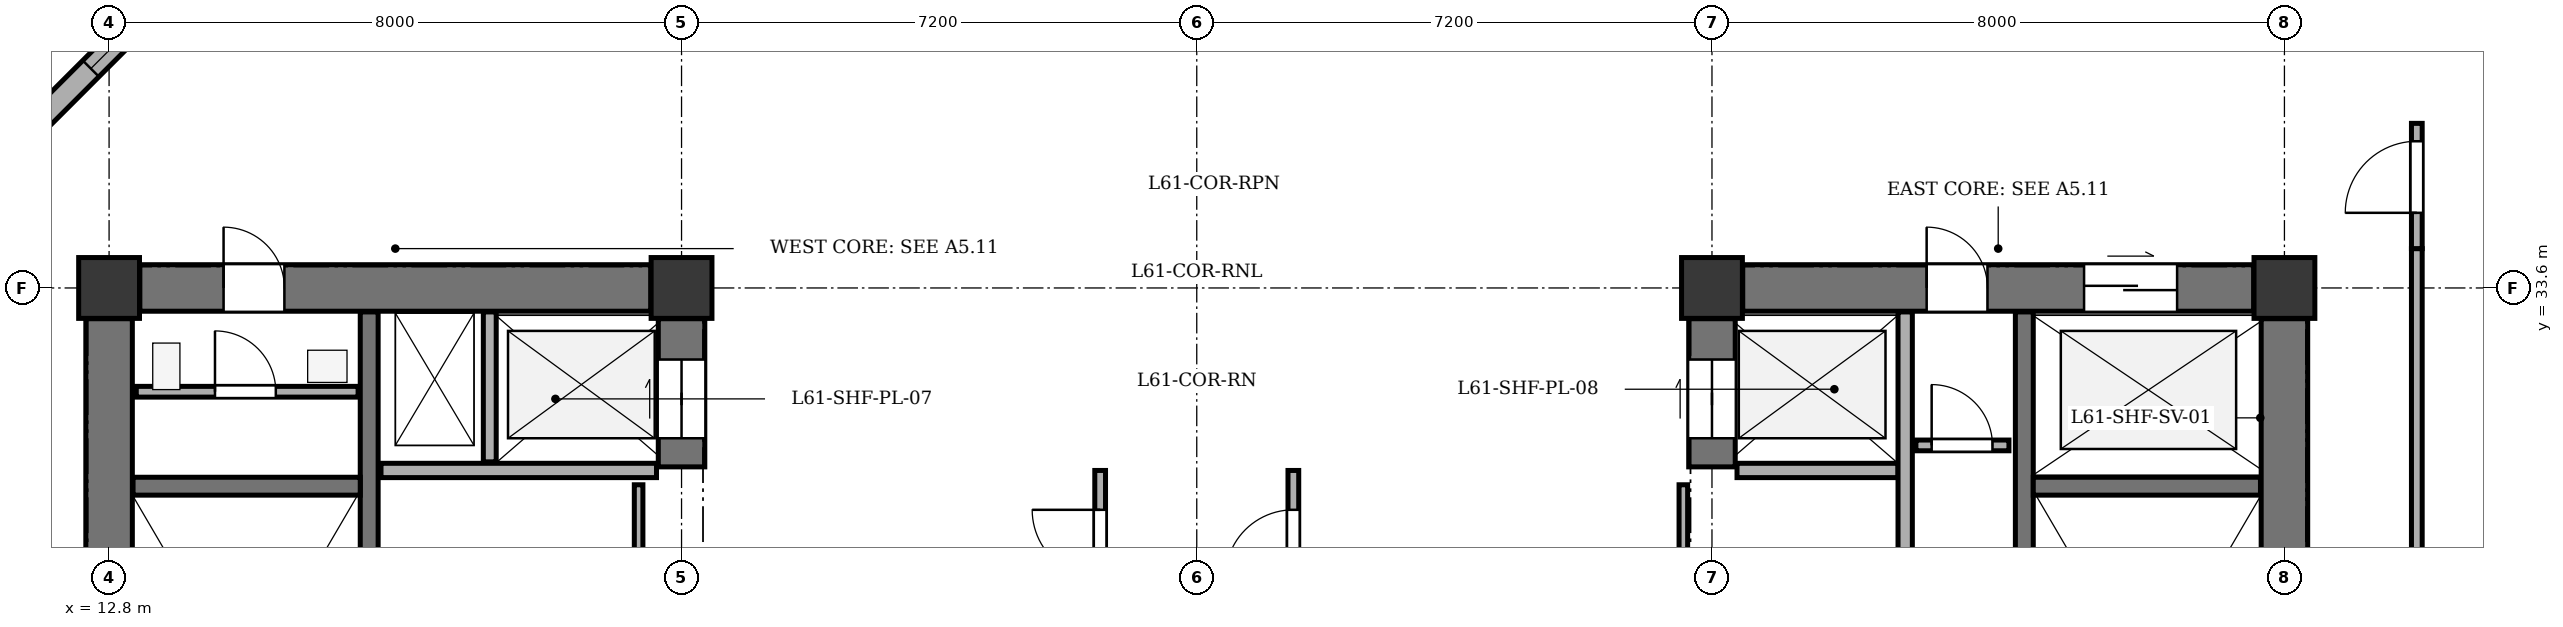
"""IFC4 building model, lengths in metres.
Left out: names, types, materials, properties, quantities, classifications, styles, units other than length and angle.
Written with IfcOpenShell. Run it as: python <this file> out.ifc"""

import sys

from ifc_helpers import new_model, si_unit, direction, frame, frame_2d, origin, origin_2d, place, context, subcontext, project, spatial, rectangle, extrude, element, fill, save


model = new_model("IFC4")
c1 = context("Model", 3, precision=1e-05, world=origin(), true_north=direction((0.0, 1.0)))
c2 = subcontext(c1, "Body", "Model", "MODEL_VIEW")
j1 = project(units=[si_unit("LENGTHUNIT", "METRE"), si_unit("PLANEANGLEUNIT", "RADIAN")], contexts=[c1])
p1 = place(None, origin())
s1 = spatial("IfcSite", under=j1, at=p1, CompositionType="ELEMENT")
p2 = place(p1, origin())
s2 = spatial("IfcBuilding", under=s1, at=p2, CompositionType="ELEMENT")
p3 = place(p2, frame((0.0, 0.0, 234.7)))
s3 = spatial("IfcBuildingStorey", under=s2, at=p3, CompositionType="ELEMENT", Elevation=234.7)
for number, where, z_axis, x_axis in (
    (1, (12.8, 33.6, 0.0), (0.0, 0.0, 1.0), (1.0, 0.0, 0.0)),
    (2, (20.8, 33.6, 0.0), (0.0, 0.0, 1.0), (1.0, 0.0, 0.0)),
    (3, (35.2, 33.6, 0.0), (0.0, 0.0, 1.0), (1.0, 0.0, 0.0)),
    (4, (43.2, 33.6, 0.0), (0.0, 0.0, 1.0), (1.0, 0.0, 0.0)),
):
    element("IfcColumn", number, at=place(p3, frame(where, z_axis=z_axis, x_axis=x_axis)), inside=s3, PredefinedType="COLUMN", context=c2, shape_type="SweptSolid", body=[
        extrude(rectangle(XDim=0.85, YDim=0.85, at=origin_2d()), origin(), (0.0, 0.0, 1.0), 3.4),
    ])
p4 = place(p3, frame((10.88, 35.0, 0.0), z_axis=(0.0, 0.0, 1.0), x_axis=(0.707106781187, 0.707106781187, 0.0)))
e5 = element("IfcWall", 5, at=p4, inside=s3, PredefinedType="STANDARD", context=c2, shape_type="SweptSolid", body=[
    extrude(rectangle(XDim=6.11, YDim=0.32, at=frame_2d((3.055, 0.0))), origin(), (0.0, 0.0, 1.0), 2.725),
])
p5 = place(p4, frame((2.355, 0.0, 0.75)))
e6 = element("IfcOpeningElement", 6, at=p5, cuts=e5, PredefinedType="OPENING", context=c2, shape_type="SweptSolid", body=[
    extrude(rectangle(XDim=1.4, YDim=1.65, at=frame_2d((0.7, 0.825))), frame((0.0, 0.17, 0.0), z_axis=(0.0, -1.0, 0.0), x_axis=(1.0, 0.0, 0.0)), (0.0, 0.0, 1.0), 0.34),
])
p6 = place(p3, frame((12.8, 21.23, 0.0), z_axis=(0.0, 0.0, 1.0), x_axis=(0.0, 1.0, 0.0)))
e7 = element("IfcWall", 7, at=p6, inside=s3, PredefinedType="SHEAR", context=c2, shape_type="SweptSolid", body=[
    extrude(rectangle(XDim=11.94, YDim=0.65, at=frame_2d((5.97, 0.0))), origin(), (0.0, 0.0, 1.0), 3.1),
])
p7 = place(p3, frame((13.23, 33.6, 0.0), z_axis=(0.0, 0.0, 1.0), x_axis=(1.0, 0.0, 0.0)))
e8 = element("IfcWall", 8, at=p7, inside=s3, PredefinedType="SHEAR", context=c2, shape_type="SweptSolid", body=[
    extrude(rectangle(XDim=7.14, YDim=0.65, at=frame_2d((3.57, 0.0))), origin(), (0.0, 0.0, 1.0), 3.1),
])
p8 = place(p7, frame((1.17, 0.0, 0.0)))
e9 = element("IfcOpeningElement", 9, at=p8, cuts=e8, PredefinedType="OPENING", context=c2, shape_type="SweptSolid", body=[
    extrude(rectangle(XDim=0.85, YDim=2.02, at=frame_2d((0.425, 1.01))), frame((0.0, 0.335, 0.0), z_axis=(0.0, -1.0, 0.0), x_axis=(1.0, 0.0, 0.0)), (0.0, 0.0, 1.0), 0.67),
])
p9 = place(p3, frame((20.8, 31.1, 0.0), z_axis=(0.0, 0.0, 1.0), x_axis=(0.0, 1.0, 0.0)))
e10 = element("IfcWall", 10, at=p9, inside=s3, PredefinedType="SHEAR", context=c2, shape_type="SweptSolid", body=[
    extrude(rectangle(XDim=2.07, YDim=0.65, at=frame_2d((1.035, 0.0))), origin(), (0.0, 0.0, 1.0), 3.1),
])
p10 = place(p9, frame((0.4, 0.0, 0.0)))
e11 = element("IfcOpeningElement", 11, at=p10, cuts=e10, PredefinedType="OPENING", context=c2, shape_type="SweptSolid", body=[
    extrude(rectangle(XDim=1.1, YDim=2.1, at=frame_2d((0.55, 1.05))), frame((0.0, 0.335, 0.0), z_axis=(0.0, -1.0, 0.0), x_axis=(1.0, 0.0, 0.0)), (0.0, 0.0, 1.0), 0.67),
])
p11 = place(p3, frame((16.435, 21.135, 0.0), z_axis=(0.0, 0.0, 1.0), x_axis=(0.0, 1.0, 0.0)))
e12 = element("IfcWall", 12, at=p11, inside=s3, PredefinedType="SHEAR", context=c2, shape_type="SweptSolid", body=[
    extrude(rectangle(XDim=12.13, YDim=0.25, at=frame_2d((6.065, 0.0))), origin(), (0.0, 0.0, 1.0), 3.1),
])
p12 = place(p11, frame((0.515, 0.0, 0.0)))
e13 = element("IfcOpeningElement", 13, at=p12, cuts=e12, PredefinedType="OPENING", context=c2, shape_type="SweptSolid", body=[
    extrude(rectangle(XDim=1.2, YDim=2.15, at=frame_2d((0.6, 1.075))), frame((0.0, 0.135, 0.0), z_axis=(0.0, -1.0, 0.0), x_axis=(1.0, 0.0, 0.0)), (0.0, 0.0, 1.0), 0.27),
])
p13 = place(p11, frame((2.665, 0.0, 0.0)))
e14 = element("IfcOpeningElement", 14, at=p13, cuts=e12, PredefinedType="OPENING", context=c2, shape_type="SweptSolid", body=[
    extrude(rectangle(XDim=1.15, YDim=2.15, at=frame_2d((0.575, 1.075))), frame((0.0, 0.135, 0.0), z_axis=(0.0, -1.0, 0.0), x_axis=(1.0, 0.0, 0.0)), (0.0, 0.0, 1.0), 0.27),
])
p14 = place(p3, frame((13.135, 30.83, 0.0), z_axis=(0.0, 0.0, 1.0), x_axis=(1.0, 0.0, 0.0)))
e15 = element("IfcWall", 15, at=p14, inside=s3, PredefinedType="SHEAR", context=c2, shape_type="SweptSolid", body=[
    extrude(rectangle(XDim=3.175, YDim=0.25, at=frame_2d((1.587, 0.0))), origin(), (0.0, 0.0, 1.0), 3.1),
])
p15 = place(p3, frame((16.6, 31.05, 0.0), z_axis=(0.0, 0.0, 1.0), x_axis=(1.0, 0.0, 0.0)))
e16 = element("IfcWall", 16, at=p15, inside=s3, PredefinedType="SOLIDWALL", context=c2, shape_type="SweptSolid", body=[
    extrude(rectangle(XDim=3.85, YDim=0.2, at=frame_2d((1.925, 0.0))), origin(), (0.0, 0.0, 1.0), 3.1),
])
p16 = place(p3, frame((18.12, 31.17, 0.0), z_axis=(0.0, 0.0, 1.0), x_axis=(0.0, 1.0, 0.0)))
e17 = element("IfcWall", 17, at=p16, inside=s3, PredefinedType="PARTITIONING", context=c2, shape_type="SweptSolid", body=[
    extrude(rectangle(XDim=2.095, YDim=0.18, at=frame_2d((1.047, 0.0))), origin(), (0.0, 0.0, 1.0), 3.1),
])
p17 = place(p3, frame((43.2, 21.23, 0.0), z_axis=(0.0, 0.0, 1.0), x_axis=(0.0, 1.0, 0.0)))
e18 = element("IfcWall", 18, at=p17, inside=s3, PredefinedType="SHEAR", context=c2, shape_type="SweptSolid", body=[
    extrude(rectangle(XDim=11.94, YDim=0.65, at=frame_2d((5.97, 0.0))), origin(), (0.0, 0.0, 1.0), 3.1),
])
p18 = place(p3, frame((35.63, 33.6, 0.0), z_axis=(0.0, 0.0, 1.0), x_axis=(1.0, 0.0, 0.0)))
e19 = element("IfcWall", 19, at=p18, inside=s3, PredefinedType="SHEAR", context=c2, shape_type="SweptSolid", body=[
    extrude(rectangle(XDim=7.14, YDim=0.65, at=frame_2d((3.57, 0.0))), origin(), (0.0, 0.0, 1.0), 3.1),
])
p19 = place(p18, frame((4.77, 0.0, 0.0)))
e20 = element("IfcOpeningElement", 20, at=p19, cuts=e19, PredefinedType="OPENING", context=c2, shape_type="SweptSolid", body=[
    extrude(rectangle(XDim=1.3, YDim=2.15, at=frame_2d((0.65, 1.075))), frame((0.0, 0.335, 0.0), z_axis=(0.0, -1.0, 0.0), x_axis=(1.0, 0.0, 0.0)), (0.0, 0.0, 1.0), 0.67),
])
p20 = place(p18, frame((2.57, 0.0, 0.0)))
e21 = element("IfcOpeningElement", 21, at=p20, cuts=e19, PredefinedType="OPENING", context=c2, shape_type="SweptSolid", body=[
    extrude(rectangle(XDim=0.85, YDim=2.02, at=frame_2d((0.425, 1.01))), frame((0.0, 0.335, 0.0), z_axis=(0.0, -1.0, 0.0), x_axis=(1.0, 0.0, 0.0)), (0.0, 0.0, 1.0), 0.67),
])
p21 = place(p3, frame((35.2, 31.1, 0.0), z_axis=(0.0, 0.0, 1.0), x_axis=(0.0, 1.0, 0.0)))
e22 = element("IfcWall", 22, at=p21, inside=s3, PredefinedType="SHEAR", context=c2, shape_type="SweptSolid", body=[
    extrude(rectangle(XDim=2.07, YDim=0.65, at=frame_2d((1.035, 0.0))), origin(), (0.0, 0.0, 1.0), 3.1),
])
p22 = place(p21, frame((0.4, 0.0, 0.0)))
e23 = element("IfcOpeningElement", 23, at=p22, cuts=e22, PredefinedType="OPENING", context=c2, shape_type="SweptSolid", body=[
    extrude(rectangle(XDim=1.1, YDim=2.1, at=frame_2d((0.55, 1.05))), frame((0.0, 0.335, 0.0), z_axis=(0.0, -1.0, 0.0), x_axis=(1.0, 0.0, 0.0)), (0.0, 0.0, 1.0), 0.67),
])
p23 = place(p3, frame((39.565, 21.135, 0.0), z_axis=(0.0, 0.0, 1.0), x_axis=(0.0, 1.0, 0.0)))
e24 = element("IfcWall", 24, at=p23, inside=s3, PredefinedType="SHEAR", context=c2, shape_type="SweptSolid", body=[
    extrude(rectangle(XDim=12.13, YDim=0.25, at=frame_2d((6.065, 0.0))), origin(), (0.0, 0.0, 1.0), 3.1),
])
p24 = place(p23, frame((0.515, 0.0, 0.0)))
e25 = element("IfcOpeningElement", 25, at=p24, cuts=e24, PredefinedType="OPENING", context=c2, shape_type="SweptSolid", body=[
    extrude(rectangle(XDim=1.2, YDim=2.15, at=frame_2d((0.6, 1.075))), frame((0.0, 0.135, 0.0), z_axis=(0.0, -1.0, 0.0), x_axis=(1.0, 0.0, 0.0)), (0.0, 0.0, 1.0), 0.27),
])
p25 = place(p23, frame((2.665, 0.0, 0.0)))
e26 = element("IfcOpeningElement", 26, at=p25, cuts=e24, PredefinedType="OPENING", context=c2, shape_type="SweptSolid", body=[
    extrude(rectangle(XDim=1.15, YDim=2.15, at=frame_2d((0.575, 1.075))), frame((0.0, 0.135, 0.0), z_axis=(0.0, -1.0, 0.0), x_axis=(1.0, 0.0, 0.0)), (0.0, 0.0, 1.0), 0.27),
])
p26 = place(p3, frame((39.69, 30.83, 0.0), z_axis=(0.0, 0.0, 1.0), x_axis=(1.0, 0.0, 0.0)))
e27 = element("IfcWall", 27, at=p26, inside=s3, PredefinedType="SHEAR", context=c2, shape_type="SweptSolid", body=[
    extrude(rectangle(XDim=3.175, YDim=0.25, at=frame_2d((1.587, 0.0))), origin(), (0.0, 0.0, 1.0), 3.1),
])
p27 = place(p3, frame((35.55, 31.05, 0.0), z_axis=(0.0, 0.0, 1.0), x_axis=(1.0, 0.0, 0.0)))
e28 = element("IfcWall", 28, at=p27, inside=s3, PredefinedType="SOLIDWALL", context=c2, shape_type="SweptSolid", body=[
    extrude(rectangle(XDim=2.25, YDim=0.2, at=frame_2d((1.125, 0.0))), origin(), (0.0, 0.0, 1.0), 3.1),
])
p28 = place(p3, frame((37.9, 25.27, 0.0), z_axis=(0.0, 0.0, 1.0), x_axis=(0.0, 1.0, 0.0)))
e29 = element("IfcWall", 29, at=p28, inside=s3, PredefinedType="SOLIDWALL", context=c2, shape_type="SweptSolid", body=[
    extrude(rectangle(XDim=7.995, YDim=0.2, at=frame_2d((3.998, 0.0))), origin(), (0.0, 0.0, 1.0), 3.1),
])
p29 = place(p3, frame((13.18, 32.15, 0.0), z_axis=(0.0, 0.0, 1.0), x_axis=(1.0, 0.0, 0.0)))
e30 = element("IfcWall", 30, at=p29, inside=s3, PredefinedType="PARTITIONING", context=c2, shape_type="SweptSolid", body=[
    extrude(rectangle(XDim=3.1, YDim=0.15, at=frame_2d((1.55, 0.0))), origin(), (0.0, 0.0, 1.0), 3.1),
])
p30 = place(p29, frame((1.1, 0.0, 0.0)))
e31 = element("IfcOpeningElement", 31, at=p30, cuts=e30, PredefinedType="OPENING", context=c2, shape_type="SweptSolid", body=[
    extrude(rectangle(XDim=0.85, YDim=2.02, at=frame_2d((0.425, 1.01))), frame((0.0, 0.085, 0.0), z_axis=(0.0, -1.0, 0.0), x_axis=(1.0, 0.0, 0.0)), (0.0, 0.0, 1.0), 0.17),
])
p31 = place(p3, frame((38.05, 31.4, 0.0), z_axis=(0.0, 0.0, 1.0), x_axis=(1.0, 0.0, 0.0)))
e32 = element("IfcWall", 32, at=p31, inside=s3, PredefinedType="PARTITIONING", context=c2, shape_type="SweptSolid", body=[
    extrude(rectangle(XDim=1.3, YDim=0.15, at=frame_2d((0.65, 0.0))), origin(), (0.0, 0.0, 1.0), 3.1),
])
p32 = place(p31, frame((0.22, 0.0, 0.0)))
e33 = element("IfcOpeningElement", 33, at=p32, cuts=e32, PredefinedType="OPENING", context=c2, shape_type="SweptSolid", body=[
    extrude(rectangle(XDim=0.85, YDim=2.02, at=frame_2d((0.425, 1.01))), frame((0.0, 0.085, 0.0), z_axis=(0.0, -1.0, 0.0), x_axis=(1.0, 0.0, 0.0)), (0.0, 0.0, 1.0), 0.17),
])
p33 = place(p3, frame((26.65, 25.23, 0.0), z_axis=(0.0, 0.0, 1.0), x_axis=(0.0, 1.0, 0.0)))
e34 = element("IfcWall", 34, at=p33, inside=s3, PredefinedType="PARTITIONING", context=c2, shape_type="SweptSolid", body=[
    extrude(rectangle(XDim=5.82, YDim=0.15, at=frame_2d((2.91, 0.0))), origin(), (0.0, 0.0, 1.0), 3.1),
])
p34 = place(p33, frame((1.42, 0.0, 0.0)))
e35 = element("IfcOpeningElement", 35, at=p34, cuts=e34, PredefinedType="OPENING", context=c2, shape_type="SweptSolid", body=[
    extrude(rectangle(XDim=0.95, YDim=2.1, at=frame_2d((0.475, 1.05))), frame((0.0, 0.085, 0.0), z_axis=(0.0, -1.0, 0.0), x_axis=(1.0, 0.0, 0.0)), (0.0, 0.0, 1.0), 0.17),
])
p35 = place(p33, frame((4.32, 0.0, 0.0)))
e36 = element("IfcOpeningElement", 36, at=p35, cuts=e34, PredefinedType="OPENING", context=c2, shape_type="SweptSolid", body=[
    extrude(rectangle(XDim=0.95, YDim=2.1, at=frame_2d((0.475, 1.05))), frame((0.0, 0.085, 0.0), z_axis=(0.0, -1.0, 0.0), x_axis=(1.0, 0.0, 0.0)), (0.0, 0.0, 1.0), 0.17),
])
p36 = place(p3, frame((20.2, 25.255, 0.0), z_axis=(0.0, 0.0, 1.0), x_axis=(0.0, 1.0, 0.0)))
e37 = element("IfcWall", 37, at=p36, inside=s3, PredefinedType="PARTITIONING", context=c2, shape_type="SweptSolid", body=[
    extrude(rectangle(XDim=5.595, YDim=0.12, at=frame_2d((2.798, 0.0))), origin(), (0.0, 0.0, 1.0), 3.1),
])
p37 = place(p36, frame((0.995, 0.0, 0.0)))
e38 = element("IfcOpeningElement", 38, at=p37, cuts=e37, PredefinedType="OPENING", context=c2, shape_type="SweptSolid", body=[
    extrude(rectangle(XDim=0.9, YDim=2.05, at=frame_2d((0.45, 1.025))), frame((0.0, 0.07, 0.0), z_axis=(0.0, -1.0, 0.0), x_axis=(1.0, 0.0, 0.0)), (0.0, 0.0, 1.0), 0.14),
])
p38 = place(p3, frame((29.35, 25.23, 0.0), z_axis=(0.0, 0.0, 1.0), x_axis=(0.0, 1.0, 0.0)))
e39 = element("IfcWall", 39, at=p38, inside=s3, PredefinedType="PARTITIONING", context=c2, shape_type="SweptSolid", body=[
    extrude(rectangle(XDim=5.82, YDim=0.15, at=frame_2d((2.91, 0.0))), origin(), (0.0, 0.0, 1.0), 3.1),
])
p39 = place(p38, frame((1.42, 0.0, 0.0)))
e40 = element("IfcOpeningElement", 40, at=p39, cuts=e39, PredefinedType="OPENING", context=c2, shape_type="SweptSolid", body=[
    extrude(rectangle(XDim=0.95, YDim=2.1, at=frame_2d((0.475, 1.05))), frame((0.0, 0.085, 0.0), z_axis=(0.0, -1.0, 0.0), x_axis=(1.0, 0.0, 0.0)), (0.0, 0.0, 1.0), 0.17),
])
p40 = place(p38, frame((4.32, 0.0, 0.0)))
e41 = element("IfcOpeningElement", 41, at=p40, cuts=e39, PredefinedType="OPENING", context=c2, shape_type="SweptSolid", body=[
    extrude(rectangle(XDim=0.95, YDim=2.1, at=frame_2d((0.475, 1.05))), frame((0.0, 0.085, 0.0), z_axis=(0.0, -1.0, 0.0), x_axis=(1.0, 0.0, 0.0)), (0.0, 0.0, 1.0), 0.17),
])
p41 = place(p3, frame((34.8, 25.25, 0.0), z_axis=(0.0, 0.0, 1.0), x_axis=(0.0, 1.0, 0.0)))
e42 = element("IfcWall", 42, at=p41, inside=s3, PredefinedType="PARTITIONING", context=c2, shape_type="SweptSolid", body=[
    extrude(rectangle(XDim=5.6, YDim=0.12, at=frame_2d((2.8, 0.0))), origin(), (0.0, 0.0, 1.0), 3.1),
])
p42 = place(p41, frame((1.0, 0.0, 0.0)))
e43 = element("IfcOpeningElement", 43, at=p42, cuts=e42, PredefinedType="OPENING", context=c2, shape_type="SweptSolid", body=[
    extrude(rectangle(XDim=0.9, YDim=2.05, at=frame_2d((0.45, 1.025))), frame((0.0, 0.07, 0.0), z_axis=(0.0, -1.0, 0.0), x_axis=(1.0, 0.0, 0.0)), (0.0, 0.0, 1.0), 0.14),
])
p43 = place(p3, frame((45.05, 20.25, 0.0), z_axis=(0.0, 0.0, 1.0), x_axis=(0.0, 1.0, 0.0)))
e44 = element("IfcWall", 44, at=p43, inside=s3, PredefinedType="PARTITIONING", context=c2, shape_type="SweptSolid", body=[
    extrude(rectangle(XDim=13.9, YDim=0.15, at=frame_2d((6.95, 0.0))), origin(), (0.0, 0.0, 1.0), 2.725),
])
p44 = place(p3, frame((45.05, 34.15, 0.0), z_axis=(0.0, 0.0, 1.0), x_axis=(0.0, 1.0, 0.0)))
e45 = element("IfcWall", 45, at=p44, inside=s3, PredefinedType="PARTITIONING", context=c2, shape_type="SweptSolid", body=[
    extrude(rectangle(XDim=1.75, YDim=0.15, at=frame_2d((0.875, 0.0))), origin(), (0.0, 0.0, 1.0), 2.725),
])
p45 = place(p44, frame((0.5, 0.0, 0.0)))
e46 = element("IfcOpeningElement", 46, at=p45, cuts=e45, PredefinedType="OPENING", context=c2, shape_type="SweptSolid", body=[
    extrude(rectangle(XDim=1.0, YDim=2.1, at=frame_2d((0.5, 1.05))), frame((0.0, 0.085, 0.0), z_axis=(0.0, -1.0, 0.0), x_axis=(1.0, 0.0, 0.0)), (0.0, 0.0, 1.0), 0.17),
])
p46 = place(p5, origin())
e47 = element("IfcWindow", 47, at=p46, inside=s3, PartitioningType="SINGLE_PANEL", PredefinedType="WINDOW", context=c2, shape_type="SweptSolid", body=[
    extrude(rectangle(XDim=1.4, YDim=1.65, at=frame_2d((0.7, 0.825))), frame((0.0, -0.01, 0.0), z_axis=(0.0, -1.0, 0.0), x_axis=(1.0, 0.0, 0.0)), (0.0, 0.0, 1.0), 0.06),
])
fill(e6, e47)
p47 = place(p8, origin())
e48 = element("IfcDoor", 48, at=p47, inside=s3, OperationType="SINGLE_SWING_LEFT", PredefinedType="DOOR", context=c2, shape_type="SweptSolid", body=[
    extrude(rectangle(XDim=0.85, YDim=2.02, at=frame_2d((0.425, 1.01))), frame((0.0, 0.025, 0.0), z_axis=(0.0, -1.0, 0.0), x_axis=(1.0, 0.0, 0.0)), (0.0, 0.0, 1.0), 0.05),
])
fill(e9, e48)
p48 = place(p10, origin())
e49 = element("IfcDoor", 49, at=p48, inside=s3, OperationType="DOUBLE_DOOR_SLIDING", PredefinedType="DOOR", context=c2, shape_type="SweptSolid", body=[
    extrude(rectangle(XDim=1.1, YDim=2.1, at=frame_2d((0.55, 1.05))), frame((0.0, 0.025, 0.0), z_axis=(0.0, -1.0, 0.0), x_axis=(1.0, 0.0, 0.0)), (0.0, 0.0, 1.0), 0.05),
])
fill(e11, e49)
p49 = place(p19, origin())
e50 = element("IfcDoor", 50, at=p49, inside=s3, OperationType="DOUBLE_DOOR_SLIDING", PredefinedType="DOOR", context=c2, shape_type="SweptSolid", body=[
    extrude(rectangle(XDim=1.3, YDim=2.15, at=frame_2d((0.65, 1.075))), frame((0.0, 0.025, 0.0), z_axis=(0.0, -1.0, 0.0), x_axis=(1.0, 0.0, 0.0)), (0.0, 0.0, 1.0), 0.05),
])
fill(e20, e50)
p50 = place(p20, origin())
e51 = element("IfcDoor", 51, at=p50, inside=s3, OperationType="SINGLE_SWING_LEFT", PredefinedType="DOOR", context=c2, shape_type="SweptSolid", body=[
    extrude(rectangle(XDim=0.85, YDim=2.02, at=frame_2d((0.425, 1.01))), frame((0.0, 0.025, 0.0), z_axis=(0.0, -1.0, 0.0), x_axis=(1.0, 0.0, 0.0)), (0.0, 0.0, 1.0), 0.05),
])
fill(e21, e51)
p51 = place(p22, origin())
e52 = element("IfcDoor", 52, at=p51, inside=s3, OperationType="DOUBLE_DOOR_SLIDING", PredefinedType="DOOR", context=c2, shape_type="SweptSolid", body=[
    extrude(rectangle(XDim=1.1, YDim=2.1, at=frame_2d((0.55, 1.05))), frame((0.0, 0.025, 0.0), z_axis=(0.0, -1.0, 0.0), x_axis=(1.0, 0.0, 0.0)), (0.0, 0.0, 1.0), 0.05),
])
fill(e23, e52)
p52 = place(p30, origin())
e53 = element("IfcDoor", 53, at=p52, inside=s3, OperationType="SINGLE_SWING_LEFT", PredefinedType="DOOR", context=c2, shape_type="SweptSolid", body=[
    extrude(rectangle(XDim=0.85, YDim=2.02, at=frame_2d((0.425, 1.01))), frame((0.0, 0.025, 0.0), z_axis=(0.0, -1.0, 0.0), x_axis=(1.0, 0.0, 0.0)), (0.0, 0.0, 1.0), 0.05),
])
fill(e31, e53)
p53 = place(p32, origin())
e54 = element("IfcDoor", 54, at=p53, inside=s3, OperationType="SINGLE_SWING_LEFT", PredefinedType="DOOR", context=c2, shape_type="SweptSolid", body=[
    extrude(rectangle(XDim=0.85, YDim=2.02, at=frame_2d((0.425, 1.01))), frame((0.0, 0.025, 0.0), z_axis=(0.0, -1.0, 0.0), x_axis=(1.0, 0.0, 0.0)), (0.0, 0.0, 1.0), 0.05),
])
fill(e33, e54)
p54 = place(p35, origin())
e55 = element("IfcDoor", 55, at=p54, inside=s3, OperationType="SINGLE_SWING_RIGHT", PredefinedType="DOOR", context=c2, shape_type="SweptSolid", body=[
    extrude(rectangle(XDim=0.95, YDim=2.1, at=frame_2d((0.475, 1.05))), frame((0.0, 0.025, 0.0), z_axis=(0.0, -1.0, 0.0), x_axis=(1.0, 0.0, 0.0)), (0.0, 0.0, 1.0), 0.05),
])
fill(e36, e55)
p55 = place(p40, origin())
e56 = element("IfcDoor", 56, at=p55, inside=s3, OperationType="SINGLE_SWING_LEFT", PredefinedType="DOOR", context=c2, shape_type="SweptSolid", body=[
    extrude(rectangle(XDim=0.95, YDim=2.1, at=frame_2d((0.475, 1.05))), frame((0.0, 0.025, 0.0), z_axis=(0.0, -1.0, 0.0), x_axis=(1.0, 0.0, 0.0)), (0.0, 0.0, 1.0), 0.05),
])
fill(e41, e56)
p56 = place(p45, origin())
e57 = element("IfcDoor", 57, at=p56, inside=s3, OperationType="SINGLE_SWING_LEFT", PredefinedType="DOOR", context=c2, shape_type="SweptSolid", body=[
    extrude(rectangle(XDim=1.0, YDim=2.1, at=frame_2d((0.5, 1.05))), frame((0.0, 0.025, 0.0), z_axis=(0.0, -1.0, 0.0), x_axis=(1.0, 0.0, 0.0)), (0.0, 0.0, 1.0), 0.05),
])
fill(e46, e57)
save(model, sys.argv[1])
